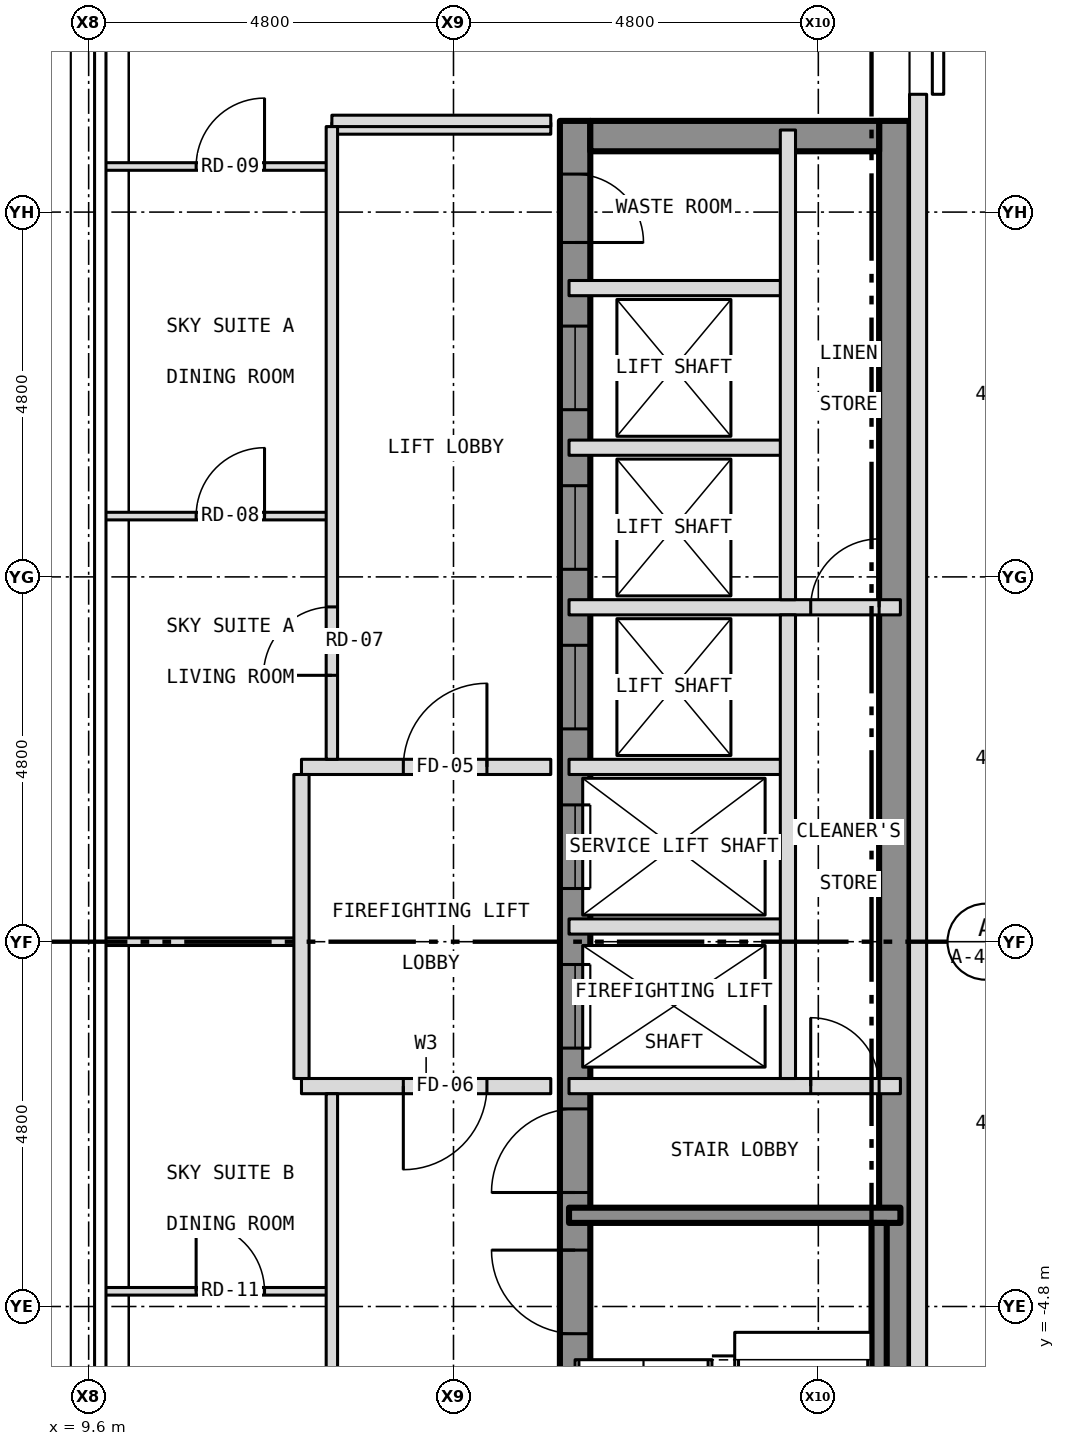
"""IFC4 building model, lengths in metres.
Left out: names, types, materials, properties, quantities, classifications, styles, units other than length and angle.
Written with IfcOpenShell. Run it as: python <this file> out.ifc"""

import sys

from ifc_helpers import new_model, si_unit, direction, frame, frame_2d, origin, place, context, subcontext, project, spatial, rectangle, extrude, element, fill, save


model = new_model("IFC4")
c1 = context("Model", 3, precision=1e-05, world=origin(), true_north=direction((0.0, 1.0)))
c2 = subcontext(c1, "Body", "Model", "MODEL_VIEW")
j1 = project(units=[si_unit("LENGTHUNIT", "METRE"), si_unit("PLANEANGLEUNIT", "RADIAN")], contexts=[c1])
p1 = place(None, origin())
s1 = spatial("IfcSite", under=j1, at=p1, CompositionType="ELEMENT")
p2 = place(p1, origin())
s2 = spatial("IfcBuilding", under=s1, at=p2, CompositionType="ELEMENT")
p3 = place(p2, frame((0.0, 0.0, 279.5)))
s3 = spatial("IfcBuildingStorey", under=s2, at=p3, CompositionType="ELEMENT", Elevation=279.5)
p4 = place(p3, frame((16.0, -10.8, 0.0), z_axis=(0.0, 0.0, 1.0), x_axis=(0.0, 1.0, 0.0)))
e1 = element("IfcWall", 1, at=p4, inside=s3, PredefinedType="SHEAR", context=c2, shape_type="SweptSolid", body=[
    extrude(rectangle(XDim=21.6, YDim=0.4, at=frame_2d((10.8, 0.0))), origin(), (0.0, 0.0, 1.0), 3.25),
])
p5 = place(p4, frame((9.4, 0.0, 0.0)))
e2 = element("IfcOpeningElement", 2, at=p5, cuts=e1, PredefinedType="OPENING", context=c2, shape_type="SweptSolid", body=[
    extrude(rectangle(XDim=1.1, YDim=2.1, at=frame_2d((0.55, 1.05))), frame((0.0, 0.212, 0.0), z_axis=(0.0, -1.0, 0.0), x_axis=(1.0, 0.0, 0.0)), (0.0, 0.0, 1.0), 0.424),
])
p6 = place(p4, frame((11.5, 0.0, 0.0)))
e3 = element("IfcOpeningElement", 3, at=p6, cuts=e1, PredefinedType="OPENING", context=c2, shape_type="SweptSolid", body=[
    extrude(rectangle(XDim=1.1, YDim=2.1, at=frame_2d((0.55, 1.05))), frame((0.0, 0.212, 0.0), z_axis=(0.0, -1.0, 0.0), x_axis=(1.0, 0.0, 0.0)), (0.0, 0.0, 1.0), 0.424),
])
p7 = place(p4, frame((13.6, 0.0, 0.0)))
e4 = element("IfcOpeningElement", 4, at=p7, cuts=e1, PredefinedType="OPENING", context=c2, shape_type="SweptSolid", body=[
    extrude(rectangle(XDim=1.1, YDim=2.1, at=frame_2d((0.55, 1.05))), frame((0.0, 0.212, 0.0), z_axis=(0.0, -1.0, 0.0), x_axis=(1.0, 0.0, 0.0)), (0.0, 0.0, 1.0), 0.424),
])
p8 = place(p4, frame((15.7, 0.0, 0.0)))
e5 = element("IfcOpeningElement", 5, at=p8, cuts=e1, PredefinedType="OPENING", context=c2, shape_type="SweptSolid", body=[
    extrude(rectangle(XDim=1.1, YDim=2.1, at=frame_2d((0.55, 1.05))), frame((0.0, 0.212, 0.0), z_axis=(0.0, -1.0, 0.0), x_axis=(1.0, 0.0, 0.0)), (0.0, 0.0, 1.0), 0.424),
])
p9 = place(p4, frame((17.8, 0.0, 0.0)))
e6 = element("IfcOpeningElement", 6, at=p9, cuts=e1, PredefinedType="OPENING", context=c2, shape_type="SweptSolid", body=[
    extrude(rectangle(XDim=1.1, YDim=2.1, at=frame_2d((0.55, 1.05))), frame((0.0, 0.212, 0.0), z_axis=(0.0, -1.0, 0.0), x_axis=(1.0, 0.0, 0.0)), (0.0, 0.0, 1.0), 0.424),
])
p10 = place(p4, frame((5.642, 0.0, 0.0)))
e7 = element("IfcOpeningElement", 7, at=p10, cuts=e1, PredefinedType="OPENING", context=c2, shape_type="SweptSolid", body=[
    extrude(rectangle(XDim=1.1, YDim=2.1, at=frame_2d((0.55, 1.05))), frame((0.0, 0.212, 0.0), z_axis=(0.0, -1.0, 0.0), x_axis=(1.0, 0.0, 0.0)), (0.0, 0.0, 1.0), 0.424),
])
p11 = place(p4, frame((7.5, 0.0, 0.0)))
e8 = element("IfcOpeningElement", 8, at=p11, cuts=e1, PredefinedType="OPENING", context=c2, shape_type="SweptSolid", body=[
    extrude(rectangle(XDim=1.1, YDim=2.1, at=frame_2d((0.55, 1.05))), frame((0.0, 0.212, 0.0), z_axis=(0.0, -1.0, 0.0), x_axis=(1.0, 0.0, 0.0)), (0.0, 0.0, 1.0), 0.424),
])
p12 = place(p4, frame((20.0, 0.0, 0.0)))
e9 = element("IfcOpeningElement", 9, at=p12, cuts=e1, PredefinedType="OPENING", context=c2, shape_type="SweptSolid", body=[
    extrude(rectangle(XDim=0.9, YDim=2.1, at=frame_2d((0.45, 1.05))), frame((0.0, 0.212, 0.0), z_axis=(0.0, -1.0, 0.0), x_axis=(1.0, 0.0, 0.0)), (0.0, 0.0, 1.0), 0.424),
])
p13 = place(p3, frame((20.2, -10.8, 0.0), z_axis=(0.0, 0.0, 1.0), x_axis=(0.0, 1.0, 0.0)))
e10 = element("IfcWall", 10, at=p13, inside=s3, PredefinedType="SHEAR", context=c2, shape_type="SweptSolid", body=[
    extrude(rectangle(XDim=21.6, YDim=0.4, at=frame_2d((10.8, 0.0))), origin(), (0.0, 0.0, 1.0), 3.25),
])
p14 = place(p3, frame((16.2, 10.6, 0.0), z_axis=(0.0, 0.0, 1.0), x_axis=(1.0, 0.0, 0.0)))
e11 = element("IfcWall", 11, at=p14, inside=s3, PredefinedType="SHEAR", context=c2, shape_type="SweptSolid", body=[
    extrude(rectangle(XDim=3.8, YDim=0.4, at=frame_2d((1.9, 0.0))), origin(), (0.0, 0.0, 1.0), 3.25),
])
p15 = place(p3, frame((20.512, -11.15, 0.0), z_axis=(0.0, 0.0, 1.0), x_axis=(0.0, 1.0, 0.0)))
e12 = element("IfcWall", 12, at=p15, inside=s3, PredefinedType="SOLIDWALL", context=c2, shape_type="SweptSolid", body=[
    extrude(rectangle(XDim=22.3, YDim=0.225, at=frame_2d((11.15, 0.0))), origin(), (0.0, 0.0, 1.0), 3.5),
])
p16 = place(p15, frame((3.3, 0.0, 1.0)))
e13 = element("IfcOpeningElement", 13, at=p16, cuts=e12, PredefinedType="OPENING", context=c2, shape_type="SweptSolid", body=[
    extrude(rectangle(XDim=0.6, YDim=1.5, at=frame_2d((0.3, 0.75))), frame((0.0, 0.125, 0.0), z_axis=(0.0, -1.0, 0.0), x_axis=(1.0, 0.0, 0.0)), (0.0, 0.0, 1.0), 0.249),
])
p17 = place(p3, frame((9.798, -4.6, 0.0), z_axis=(0.0, 0.0, 1.0), x_axis=(1.0, 0.0, 0.0)))
e14 = element("IfcWall", 14, at=p17, inside=s3, PredefinedType="PARTITIONING", context=c2, shape_type="SweptSolid", body=[
    extrude(rectangle(XDim=3.002, YDim=0.1, at=frame_2d((1.501, 0.0))), origin(), (0.0, 0.0, 1.0), 3.35),
])
p18 = place(p17, frame((1.216, 0.0, 0.0)))
e15 = element("IfcOpeningElement", 15, at=p18, cuts=e14, PredefinedType="OPENING", context=c2, shape_type="SweptSolid", body=[
    extrude(rectangle(XDim=0.9, YDim=2.1, at=frame_2d((0.45, 1.05))), frame((0.0, 0.062, 0.0), z_axis=(0.0, -1.0, 0.0), x_axis=(1.0, 0.0, 0.0)), (0.0, 0.0, 1.0), 0.124),
])
p19 = place(p3, frame((15.92, -3.6, 0.0), z_axis=(0.0, 0.0, 1.0), x_axis=(1.0, 0.0, 0.0)))
e16 = element("IfcWall", 16, at=p19, inside=s3, PredefinedType="SHEAR", context=c2, shape_type="SweptSolid", body=[
    extrude(rectangle(XDim=4.36, YDim=0.2, at=frame_2d((2.18, 0.0))), origin(), (0.0, 0.0, 1.0), 3.25),
])
p20 = place(p3, frame((12.4, -1.9, 0.0), z_axis=(0.0, 0.0, 1.0), x_axis=(1.0, 0.0, 0.0)))
e17 = element("IfcWall", 17, at=p20, inside=s3, PredefinedType="PARTITIONING", context=c2, shape_type="SweptSolid", body=[
    extrude(rectangle(XDim=3.28, YDim=0.2, at=frame_2d((1.64, 0.0))), origin(), (0.0, 0.0, 1.0), 3.35),
])
p21 = place(p20, frame((1.34, 0.0, 0.0)))
e18 = element("IfcOpeningElement", 18, at=p21, cuts=e17, PredefinedType="OPENING", context=c2, shape_type="SweptSolid", body=[
    extrude(rectangle(XDim=1.1, YDim=2.1, at=frame_2d((0.55, 1.05))), frame((0.0, 0.112, 0.0), z_axis=(0.0, -1.0, 0.0), x_axis=(1.0, 0.0, 0.0)), (0.0, 0.0, 1.0), 0.224),
])
p22 = place(p3, frame((15.92, -1.9, 0.0), z_axis=(0.0, 0.0, 1.0), x_axis=(1.0, 0.0, 0.0)))
e19 = element("IfcWall", 19, at=p22, inside=s3, PredefinedType="PARTITIONING", context=c2, shape_type="SweptSolid", body=[
    extrude(rectangle(XDim=4.36, YDim=0.2, at=frame_2d((2.18, 0.0))), origin(), (0.0, 0.0, 1.0), 3.25),
])
p23 = place(p22, frame((3.18, 0.0, 0.0)))
e20 = element("IfcOpeningElement", 20, at=p23, cuts=e19, PredefinedType="OPENING", context=c2, shape_type="SweptSolid", body=[
    extrude(rectangle(XDim=0.9, YDim=2.1, at=frame_2d((0.45, 1.05))), frame((0.0, 0.112, 0.0), z_axis=(0.0, -1.0, 0.0), x_axis=(1.0, 0.0, 0.0)), (0.0, 0.0, 1.0), 0.224),
])
p24 = place(p3, frame((9.798, 0.0, 0.0), z_axis=(0.0, 0.0, 1.0), x_axis=(1.0, 0.0, 0.0)))
e21 = element("IfcWall", 21, at=p24, inside=s3, PredefinedType="PARTITIONING", context=c2, shape_type="SweptSolid", body=[
    extrude(rectangle(XDim=2.602, YDim=0.1, at=frame_2d((1.301, 0.0))), origin(), (0.0, 0.0, 1.0), 2.728),
])
p25 = place(p3, frame((15.92, 0.2, 0.0), z_axis=(0.0, 0.0, 1.0), x_axis=(1.0, 0.0, 0.0)))
e22 = element("IfcWall", 22, at=p25, inside=s3, PredefinedType="PARTITIONING", context=c2, shape_type="SweptSolid", body=[
    extrude(rectangle(XDim=2.88, YDim=0.2, at=frame_2d((1.44, 0.0))), origin(), (0.0, 0.0, 1.0), 3.25),
])
p26 = place(p3, frame((12.4, 2.3, 0.0), z_axis=(0.0, 0.0, 1.0), x_axis=(1.0, 0.0, 0.0)))
e23 = element("IfcWall", 23, at=p26, inside=s3, PredefinedType="PARTITIONING", context=c2, shape_type="SweptSolid", body=[
    extrude(rectangle(XDim=3.28, YDim=0.2, at=frame_2d((1.64, 0.0))), origin(), (0.0, 0.0, 1.0), 3.35),
])
p27 = place(p26, frame((1.34, 0.0, 0.0)))
e24 = element("IfcOpeningElement", 24, at=p27, cuts=e23, PredefinedType="OPENING", context=c2, shape_type="SweptSolid", body=[
    extrude(rectangle(XDim=1.1, YDim=2.1, at=frame_2d((0.55, 1.05))), frame((0.0, 0.112, 0.0), z_axis=(0.0, -1.0, 0.0), x_axis=(1.0, 0.0, 0.0)), (0.0, 0.0, 1.0), 0.224),
])
p28 = place(p3, frame((15.92, 2.3, 0.0), z_axis=(0.0, 0.0, 1.0), x_axis=(1.0, 0.0, 0.0)))
e25 = element("IfcWall", 25, at=p28, inside=s3, PredefinedType="PARTITIONING", context=c2, shape_type="SweptSolid", body=[
    extrude(rectangle(XDim=2.88, YDim=0.2, at=frame_2d((1.44, 0.0))), origin(), (0.0, 0.0, 1.0), 3.25),
])
p29 = place(p3, frame((15.92, 4.4, 0.0), z_axis=(0.0, 0.0, 1.0), x_axis=(1.0, 0.0, 0.0)))
e26 = element("IfcWall", 26, at=p29, inside=s3, PredefinedType="PARTITIONING", context=c2, shape_type="SweptSolid", body=[
    extrude(rectangle(XDim=4.36, YDim=0.2, at=frame_2d((2.18, 0.0))), origin(), (0.0, 0.0, 1.0), 3.25),
])
p30 = place(p29, frame((3.18, 0.0, 0.0)))
e27 = element("IfcOpeningElement", 27, at=p30, cuts=e26, PredefinedType="OPENING", context=c2, shape_type="SweptSolid", body=[
    extrude(rectangle(XDim=0.9, YDim=2.1, at=frame_2d((0.45, 1.05))), frame((0.0, 0.112, 0.0), z_axis=(0.0, -1.0, 0.0), x_axis=(1.0, 0.0, 0.0)), (0.0, 0.0, 1.0), 0.224),
])
p31 = place(p3, frame((9.798, 5.6, 0.0), z_axis=(0.0, 0.0, 1.0), x_axis=(1.0, 0.0, 0.0)))
e28 = element("IfcWall", 28, at=p31, inside=s3, PredefinedType="PARTITIONING", context=c2, shape_type="SweptSolid", body=[
    extrude(rectangle(XDim=3.002, YDim=0.1, at=frame_2d((1.501, 0.0))), origin(), (0.0, 0.0, 1.0), 3.35),
])
p32 = place(p31, frame((1.216, 0.0, 0.0)))
e29 = element("IfcOpeningElement", 29, at=p32, cuts=e28, PredefinedType="OPENING", context=c2, shape_type="SweptSolid", body=[
    extrude(rectangle(XDim=0.9, YDim=2.1, at=frame_2d((0.45, 1.05))), frame((0.0, 0.062, 0.0), z_axis=(0.0, -1.0, 0.0), x_axis=(1.0, 0.0, 0.0)), (0.0, 0.0, 1.0), 0.124),
])
for number, where, z_axis, x_axis in (
    (30, (15.92, 6.5, 0.0), (0.0, 0.0, 1.0), (1.0, 0.0, 0.0)),
    (31, (15.92, 8.6, 0.0), (0.0, 0.0, 1.0), (1.0, 0.0, 0.0)),
):
    element("IfcWall", number, at=place(p3, frame(where, z_axis=z_axis, x_axis=x_axis)), inside=s3, PredefinedType="PARTITIONING", context=c2, shape_type="SweptSolid", body=[
        extrude(rectangle(XDim=2.88, YDim=0.2, at=frame_2d((1.44, 0.0))), origin(), (0.0, 0.0, 1.0), 3.25),
    ])
p33 = place(p3, frame((9.798, 10.2, 0.0), z_axis=(0.0, 0.0, 1.0), x_axis=(1.0, 0.0, 0.0)))
e32 = element("IfcWall", 32, at=p33, inside=s3, PredefinedType="PARTITIONING", context=c2, shape_type="SweptSolid", body=[
    extrude(rectangle(XDim=3.002, YDim=0.1, at=frame_2d((1.501, 0.0))), origin(), (0.0, 0.0, 1.0), 3.35),
])
p34 = place(p33, frame((1.216, 0.0, 0.0)))
e33 = element("IfcOpeningElement", 33, at=p34, cuts=e32, PredefinedType="OPENING", context=c2, shape_type="SweptSolid", body=[
    extrude(rectangle(XDim=0.9, YDim=2.1, at=frame_2d((0.45, 1.05))), frame((0.0, 0.062, 0.0), z_axis=(0.0, -1.0, 0.0), x_axis=(1.0, 0.0, 0.0)), (0.0, 0.0, 1.0), 0.124),
])
for number, where, z_axis, x_axis in (
    (34, (12.8, 10.7, 0.0), (0.0, 0.0, 1.0), (1.0, 0.0, 0.0)),
    (35, (12.8, 10.8, 0.0), (0.0, 0.0, 1.0), (1.0, 0.0, 0.0)),
):
    element("IfcWall", number, at=place(p3, frame(where, z_axis=z_axis, x_axis=x_axis)), inside=s3, PredefinedType="PARTITIONING", context=c2, shape_type="SweptSolid", body=[
        extrude(rectangle(XDim=2.88, YDim=0.15, at=frame_2d((1.44, 0.0))), origin(), (0.0, 0.0, 1.0), 3.35),
    ])
p35 = place(p3, frame((12.4, -1.8, 0.0), z_axis=(0.0, 0.0, 1.0), x_axis=(0.0, 1.0, 0.0)))
e36 = element("IfcWall", 36, at=p35, inside=s3, PredefinedType="PARTITIONING", context=c2, shape_type="SweptSolid", body=[
    extrude(rectangle(XDim=4.0, YDim=0.2, at=frame_2d((2.0, 0.0))), origin(), (0.0, 0.0, 1.0), 3.35),
])
p36 = place(p3, frame((12.8, -10.725, 0.0), z_axis=(0.0, 0.0, 1.0), x_axis=(0.0, 1.0, 0.0)))
e37 = element("IfcWall", 37, at=p36, inside=s3, PredefinedType="PARTITIONING", context=c2, shape_type="SweptSolid", body=[
    extrude(rectangle(XDim=8.725, YDim=0.15, at=frame_2d((4.363, 0.0))), origin(), (0.0, 0.0, 1.0), 3.35),
])
p37 = place(p36, frame((2.88, 0.0, 0.0)))
e38 = element("IfcOpeningElement", 38, at=p37, cuts=e37, PredefinedType="OPENING", context=c2, shape_type="SweptSolid", body=[
    extrude(rectangle(XDim=0.9, YDim=2.1, at=frame_2d((0.45, 1.05))), frame((0.0, 0.087, 0.0), z_axis=(0.0, -1.0, 0.0), x_axis=(1.0, 0.0, 0.0)), (0.0, 0.0, 1.0), 0.174),
])
p38 = place(p3, frame((12.8, 2.4, 0.0), z_axis=(0.0, 0.0, 1.0), x_axis=(0.0, 1.0, 0.0)))
e39 = element("IfcWall", 39, at=p38, inside=s3, PredefinedType="PARTITIONING", context=c2, shape_type="SweptSolid", body=[
    extrude(rectangle(XDim=8.325, YDim=0.15, at=frame_2d((4.163, 0.0))), origin(), (0.0, 0.0, 1.0), 3.35),
])
p39 = place(p38, frame((1.105, 0.0, 0.0)))
e40 = element("IfcOpeningElement", 40, at=p39, cuts=e39, PredefinedType="OPENING", context=c2, shape_type="SweptSolid", body=[
    extrude(rectangle(XDim=0.9, YDim=2.1, at=frame_2d((0.45, 1.05))), frame((0.0, 0.087, 0.0), z_axis=(0.0, -1.0, 0.0), x_axis=(1.0, 0.0, 0.0)), (0.0, 0.0, 1.0), 0.174),
])
p40 = place(p3, frame((18.8, -1.8, 0.0), z_axis=(0.0, 0.0, 1.0), x_axis=(0.0, 1.0, 0.0)))
e41 = element("IfcWall", 41, at=p40, inside=s3, PredefinedType="PARTITIONING", context=c2, shape_type="SweptSolid", body=[
    extrude(rectangle(XDim=6.1, YDim=0.2, at=frame_2d((3.05, 0.0))), origin(), (0.0, 0.0, 1.0), 3.25),
])
p41 = place(p3, frame((18.8, 4.5, 0.0), z_axis=(0.0, 0.0, 1.0), x_axis=(0.0, 1.0, 0.0)))
e42 = element("IfcWall", 42, at=p41, inside=s3, PredefinedType="PARTITIONING", context=c2, shape_type="SweptSolid", body=[
    extrude(rectangle(XDim=6.18, YDim=0.2, at=frame_2d((3.09, 0.0))), origin(), (0.0, 0.0, 1.0), 3.25),
])
p42 = place(p3, frame((20.0, -10.68, 0.0), z_axis=(0.0, 0.0, 1.0), x_axis=(0.0, 1.0, 0.0)))
e43 = element("IfcWall", 43, at=p42, inside=s3, PredefinedType="SHEAR", context=c2, shape_type="SweptSolid", body=[
    extrude(rectangle(XDim=6.98, YDim=0.2, at=frame_2d((3.49, 0.0))), origin(), (0.0, 0.0, 1.0), 3.25),
])
p43 = place(p5, origin())
e44 = element("IfcDoor", 44, at=p43, inside=s3, OperationType="SLIDING_TO_LEFT", PredefinedType="DOOR", context=c2, shape_type="SweptSolid", body=[
    extrude(rectangle(XDim=1.1, YDim=2.1, at=frame_2d((0.55, 1.05))), frame((0.0, 0.025, 0.0), z_axis=(0.0, -1.0, 0.0), x_axis=(1.0, 0.0, 0.0)), (0.0, 0.0, 1.0), 0.05),
])
fill(e2, e44)
p44 = place(p6, origin())
e45 = element("IfcDoor", 45, at=p44, inside=s3, OperationType="SLIDING_TO_LEFT", PredefinedType="DOOR", context=c2, shape_type="SweptSolid", body=[
    extrude(rectangle(XDim=1.1, YDim=2.1, at=frame_2d((0.55, 1.05))), frame((0.0, 0.025, 0.0), z_axis=(0.0, -1.0, 0.0), x_axis=(1.0, 0.0, 0.0)), (0.0, 0.0, 1.0), 0.05),
])
fill(e3, e45)
p45 = place(p7, origin())
e46 = element("IfcDoor", 46, at=p45, inside=s3, OperationType="SLIDING_TO_LEFT", PredefinedType="DOOR", context=c2, shape_type="SweptSolid", body=[
    extrude(rectangle(XDim=1.1, YDim=2.1, at=frame_2d((0.55, 1.05))), frame((0.0, 0.025, 0.0), z_axis=(0.0, -1.0, 0.0), x_axis=(1.0, 0.0, 0.0)), (0.0, 0.0, 1.0), 0.05),
])
fill(e4, e46)
p46 = place(p8, origin())
e47 = element("IfcDoor", 47, at=p46, inside=s3, OperationType="SLIDING_TO_LEFT", PredefinedType="DOOR", context=c2, shape_type="SweptSolid", body=[
    extrude(rectangle(XDim=1.1, YDim=2.1, at=frame_2d((0.55, 1.05))), frame((0.0, 0.025, 0.0), z_axis=(0.0, -1.0, 0.0), x_axis=(1.0, 0.0, 0.0)), (0.0, 0.0, 1.0), 0.05),
])
fill(e5, e47)
p47 = place(p9, origin())
e48 = element("IfcDoor", 48, at=p47, inside=s3, OperationType="SLIDING_TO_LEFT", PredefinedType="DOOR", context=c2, shape_type="SweptSolid", body=[
    extrude(rectangle(XDim=1.1, YDim=2.1, at=frame_2d((0.55, 1.05))), frame((0.0, 0.025, 0.0), z_axis=(0.0, -1.0, 0.0), x_axis=(1.0, 0.0, 0.0)), (0.0, 0.0, 1.0), 0.05),
])
fill(e6, e48)
p48 = place(p10, origin())
e49 = element("IfcDoor", 49, at=p48, inside=s3, OperationType="SINGLE_SWING_RIGHT", PredefinedType="DOOR", context=c2, shape_type="SweptSolid", body=[
    extrude(rectangle(XDim=1.1, YDim=2.1, at=frame_2d((0.55, 1.05))), frame((0.0, 0.025, 0.0), z_axis=(0.0, -1.0, 0.0), x_axis=(1.0, 0.0, 0.0)), (0.0, 0.0, 1.0), 0.05),
])
fill(e7, e49)
p49 = place(p11, origin())
e50 = element("IfcDoor", 50, at=p49, inside=s3, OperationType="SINGLE_SWING_LEFT", PredefinedType="DOOR", context=c2, shape_type="SweptSolid", body=[
    extrude(rectangle(XDim=1.1, YDim=2.1, at=frame_2d((0.55, 1.05))), frame((0.0, 0.025, 0.0), z_axis=(0.0, -1.0, 0.0), x_axis=(1.0, 0.0, 0.0)), (0.0, 0.0, 1.0), 0.05),
])
fill(e8, e50)
p50 = place(p12, origin())
e51 = element("IfcDoor", 51, at=p50, inside=s3, OperationType="SINGLE_SWING_LEFT", PredefinedType="DOOR", context=c2, shape_type="SweptSolid", body=[
    extrude(rectangle(XDim=0.9, YDim=2.1, at=frame_2d((0.45, 1.05))), frame((0.0, 0.025, 0.0), z_axis=(0.0, -1.0, 0.0), x_axis=(1.0, 0.0, 0.0)), (0.0, 0.0, 1.0), 0.05),
])
fill(e9, e51)
p51 = place(p23, origin())
e52 = element("IfcDoor", 52, at=p51, inside=s3, OperationType="SINGLE_SWING_LEFT", PredefinedType="DOOR", context=c2, shape_type="SweptSolid", body=[
    extrude(rectangle(XDim=0.9, YDim=2.1, at=frame_2d((0.45, 1.05))), frame((0.0, 0.025, 0.0), z_axis=(0.0, -1.0, 0.0), x_axis=(1.0, 0.0, 0.0)), (0.0, 0.0, 1.0), 0.05),
])
fill(e20, e52)
p52 = place(p30, origin())
e53 = element("IfcDoor", 53, at=p52, inside=s3, OperationType="SINGLE_SWING_RIGHT", PredefinedType="DOOR", context=c2, shape_type="SweptSolid", body=[
    extrude(rectangle(XDim=0.9, YDim=2.1, at=frame_2d((0.45, 1.05))), frame((0.0, 0.025, 0.0), z_axis=(0.0, -1.0, 0.0), x_axis=(1.0, 0.0, 0.0)), (0.0, 0.0, 1.0), 0.05),
])
fill(e27, e53)
p53 = place(p27, origin())
e54 = element("IfcDoor", 54, at=p53, inside=s3, OperationType="SINGLE_SWING_RIGHT", PredefinedType="DOOR", context=c2, shape_type="SweptSolid", body=[
    extrude(rectangle(XDim=1.1, YDim=2.1, at=frame_2d((0.55, 1.05))), frame((0.0, 0.025, 0.0), z_axis=(0.0, -1.0, 0.0), x_axis=(1.0, 0.0, 0.0)), (0.0, 0.0, 1.0), 0.05),
])
fill(e24, e54)
p54 = place(p21, origin())
e55 = element("IfcDoor", 55, at=p54, inside=s3, OperationType="SINGLE_SWING_LEFT", PredefinedType="DOOR", context=c2, shape_type="SweptSolid", body=[
    extrude(rectangle(XDim=1.1, YDim=2.1, at=frame_2d((0.55, 1.05))), frame((0.0, 0.025, 0.0), z_axis=(0.0, -1.0, 0.0), x_axis=(1.0, 0.0, 0.0)), (0.0, 0.0, 1.0), 0.05),
])
fill(e18, e55)
p55 = place(p39, origin())
e56 = element("IfcDoor", 56, at=p55, inside=s3, OperationType="SINGLE_SWING_LEFT", PredefinedType="DOOR", context=c2, shape_type="SweptSolid", body=[
    extrude(rectangle(XDim=0.9, YDim=2.1, at=frame_2d((0.45, 1.05))), frame((0.0, 0.025, 0.0), z_axis=(0.0, -1.0, 0.0), x_axis=(1.0, 0.0, 0.0)), (0.0, 0.0, 1.0), 0.05),
])
fill(e40, e56)
p56 = place(p32, origin())
e57 = element("IfcDoor", 57, at=p56, inside=s3, OperationType="SINGLE_SWING_RIGHT", PredefinedType="DOOR", context=c2, shape_type="SweptSolid", body=[
    extrude(rectangle(XDim=0.9, YDim=2.1, at=frame_2d((0.45, 1.05))), frame((0.0, 0.025, 0.0), z_axis=(0.0, -1.0, 0.0), x_axis=(1.0, 0.0, 0.0)), (0.0, 0.0, 1.0), 0.05),
])
fill(e29, e57)
p57 = place(p34, origin())
e58 = element("IfcDoor", 58, at=p57, inside=s3, OperationType="SINGLE_SWING_RIGHT", PredefinedType="DOOR", context=c2, shape_type="SweptSolid", body=[
    extrude(rectangle(XDim=0.9, YDim=2.1, at=frame_2d((0.45, 1.05))), frame((0.0, 0.025, 0.0), z_axis=(0.0, -1.0, 0.0), x_axis=(1.0, 0.0, 0.0)), (0.0, 0.0, 1.0), 0.05),
])
fill(e33, e58)
p58 = place(p18, origin())
e59 = element("IfcDoor", 59, at=p58, inside=s3, OperationType="SINGLE_SWING_LEFT", PredefinedType="DOOR", context=c2, shape_type="SweptSolid", body=[
    extrude(rectangle(XDim=0.9, YDim=2.1, at=frame_2d((0.45, 1.05))), frame((0.0, 0.025, 0.0), z_axis=(0.0, -1.0, 0.0), x_axis=(1.0, 0.0, 0.0)), (0.0, 0.0, 1.0), 0.05),
])
fill(e15, e59)
save(model, sys.argv[1])
